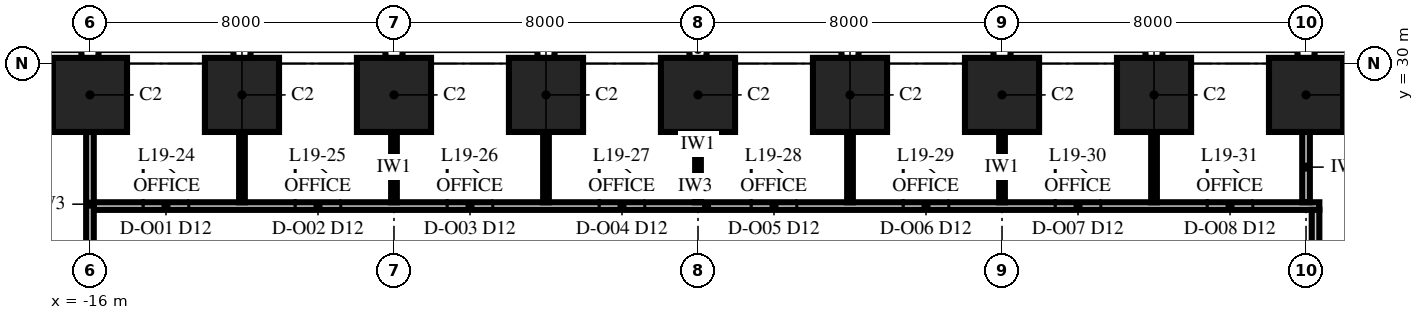
"""IFC4 building model, lengths in metres.
Left out: names, types, materials, properties, quantities, classifications, styles, units other than length and angle.
Written with IfcOpenShell. Run it as: python <this file> out.ifc"""

import sys

from ifc_helpers import new_model, si_unit, direction, frame, frame_2d, origin, origin_2d, place, context, subcontext, project, spatial, rectangle, extrude, element, fill, save


model = new_model("IFC4")
c1 = context("Model", 3, precision=1e-05, world=origin(), true_north=direction((0.0, 1.0)))
c2 = subcontext(c1, "Body", "Model", "MODEL_VIEW")
j1 = project(units=[si_unit("LENGTHUNIT", "METRE"), si_unit("PLANEANGLEUNIT", "RADIAN")], contexts=[c1])
p1 = place(None, origin())
s1 = spatial("IfcSite", under=j1, at=p1, CompositionType="ELEMENT")
p2 = place(p1, origin())
s2 = spatial("IfcBuilding", under=s1, at=p2, CompositionType="ELEMENT")
p3 = place(p2, frame((0.0, 0.0, 88.0)))
s3 = spatial("IfcBuildingStorey", under=s2, at=p3, CompositionType="ELEMENT", Elevation=88.0)
for number, where, z_axis, x_axis in (
    (1, (16.0, 29.175, 0.0), (0.0, 0.0, 1.0), (-1.0, 0.0, 0.0)),
    (2, (12.0, 29.175, 0.0), (0.0, 0.0, 1.0), (-1.0, 0.0, 0.0)),
    (3, (8.0, 29.175, 0.0), (0.0, 0.0, 1.0), (-1.0, 0.0, 0.0)),
    (4, (4.0, 29.175, 0.0), (0.0, 0.0, 1.0), (-1.0, 0.0, 0.0)),
    (5, (0.0, 29.175, 0.0), (0.0, 0.0, 1.0), (-1.0, 0.0, 0.0)),
    (6, (-4.0, 29.175, 0.0), (0.0, 0.0, 1.0), (-1.0, 0.0, 0.0)),
    (7, (-8.0, 29.175, 0.0), (0.0, 0.0, 1.0), (-1.0, 0.0, 0.0)),
    (8, (-12.0, 29.175, 0.0), (0.0, 0.0, 1.0), (-1.0, 0.0, 0.0)),
    (9, (-16.0, 29.175, 0.0), (0.0, 0.0, 1.0), (-1.0, 0.0, 0.0)),
):
    element("IfcColumn", number, at=place(p3, frame(where, z_axis=z_axis, x_axis=x_axis)), inside=s3, PredefinedType="COLUMN", context=c2, shape_type="SweptSolid", body=[
        extrude(rectangle(XDim=1.95, YDim=1.95, at=origin_2d()), origin(), (0.0, 0.0, 1.0), 4.0),
    ])
p4 = place(p3, frame((-15.9, 26.25, 0.0), z_axis=(0.0, 0.0, 1.0), x_axis=(1.0, 0.0, 0.0)))
e10 = element("IfcWall", 10, at=p4, inside=s3, PredefinedType="PARTITIONING", context=c2, shape_type="SweptSolid", body=[
    extrude(rectangle(XDim=32.25, YDim=0.2, at=frame_2d((16.125, 0.0))), origin(), (0.0, 0.0, 1.0), 3.318),
])
p5 = place(p4, frame((1.3, 0.0, 0.0)))
e11 = element("IfcOpeningElement", 11, at=p5, cuts=e10, PredefinedType="OPENING", context=c2, shape_type="SweptSolid", body=[
    extrude(rectangle(XDim=1.2, YDim=2.4, at=frame_2d((0.6, 1.2))), frame((0.0, 0.115, 0.0), z_axis=(0.0, -1.0, 0.0), x_axis=(1.0, 0.0, 0.0)), (0.0, 0.0, 1.0), 0.23),
])
p6 = place(p4, frame((5.3, 0.0, 0.0)))
e12 = element("IfcOpeningElement", 12, at=p6, cuts=e10, PredefinedType="OPENING", context=c2, shape_type="SweptSolid", body=[
    extrude(rectangle(XDim=1.2, YDim=2.4, at=frame_2d((0.6, 1.2))), frame((0.0, 0.115, 0.0), z_axis=(0.0, -1.0, 0.0), x_axis=(1.0, 0.0, 0.0)), (0.0, 0.0, 1.0), 0.23),
])
p7 = place(p4, frame((9.3, 0.0, 0.0)))
e13 = element("IfcOpeningElement", 13, at=p7, cuts=e10, PredefinedType="OPENING", context=c2, shape_type="SweptSolid", body=[
    extrude(rectangle(XDim=1.2, YDim=2.4, at=frame_2d((0.6, 1.2))), frame((0.0, 0.115, 0.0), z_axis=(0.0, -1.0, 0.0), x_axis=(1.0, 0.0, 0.0)), (0.0, 0.0, 1.0), 0.23),
])
p8 = place(p4, frame((13.3, 0.0, 0.0)))
e14 = element("IfcOpeningElement", 14, at=p8, cuts=e10, PredefinedType="OPENING", context=c2, shape_type="SweptSolid", body=[
    extrude(rectangle(XDim=1.2, YDim=2.4, at=frame_2d((0.6, 1.2))), frame((0.0, 0.115, 0.0), z_axis=(0.0, -1.0, 0.0), x_axis=(1.0, 0.0, 0.0)), (0.0, 0.0, 1.0), 0.23),
])
p9 = place(p4, frame((17.3, 0.0, 0.0)))
e15 = element("IfcOpeningElement", 15, at=p9, cuts=e10, PredefinedType="OPENING", context=c2, shape_type="SweptSolid", body=[
    extrude(rectangle(XDim=1.2, YDim=2.4, at=frame_2d((0.6, 1.2))), frame((0.0, 0.115, 0.0), z_axis=(0.0, -1.0, 0.0), x_axis=(1.0, 0.0, 0.0)), (0.0, 0.0, 1.0), 0.23),
])
p10 = place(p4, frame((21.3, 0.0, 0.0)))
e16 = element("IfcOpeningElement", 16, at=p10, cuts=e10, PredefinedType="OPENING", context=c2, shape_type="SweptSolid", body=[
    extrude(rectangle(XDim=1.2, YDim=2.4, at=frame_2d((0.6, 1.2))), frame((0.0, 0.115, 0.0), z_axis=(0.0, -1.0, 0.0), x_axis=(1.0, 0.0, 0.0)), (0.0, 0.0, 1.0), 0.23),
])
p11 = place(p4, frame((25.3, 0.0, 0.0)))
e17 = element("IfcOpeningElement", 17, at=p11, cuts=e10, PredefinedType="OPENING", context=c2, shape_type="SweptSolid", body=[
    extrude(rectangle(XDim=1.2, YDim=2.4, at=frame_2d((0.6, 1.2))), frame((0.0, 0.115, 0.0), z_axis=(0.0, -1.0, 0.0), x_axis=(1.0, 0.0, 0.0)), (0.0, 0.0, 1.0), 0.23),
])
p12 = place(p4, frame((29.3, 0.0, 0.0)))
e18 = element("IfcOpeningElement", 18, at=p12, cuts=e10, PredefinedType="OPENING", context=c2, shape_type="SweptSolid", body=[
    extrude(rectangle(XDim=1.2, YDim=2.4, at=frame_2d((0.6, 1.2))), frame((0.0, 0.115, 0.0), z_axis=(0.0, -1.0, 0.0), x_axis=(1.0, 0.0, 0.0)), (0.0, 0.0, 1.0), 0.23),
])
p13 = place(p3, frame((-16.0, 24.4, 0.0), z_axis=(0.0, 0.0, 1.0), x_axis=(0.0, 1.0, 0.0)))
e19 = element("IfcWall", 19, at=p13, inside=s3, PredefinedType="PARTITIONING", context=c2, shape_type="SweptSolid", body=[
    extrude(rectangle(XDim=3.8, YDim=0.2, at=frame_2d((1.9, 0.0))), origin(), (0.0, 0.0, 1.0), 3.226),
])
for number, where, z_axis, x_axis in (
    (20, (-12.0, 26.35, 0.0), (0.0, 0.0, 1.0), (0.0, 1.0, 0.0)),
    (21, (-8.0, 26.35, 0.0), (0.0, 0.0, 1.0), (0.0, 1.0, 0.0)),
    (22, (-4.0, 26.35, 0.0), (0.0, 0.0, 1.0), (0.0, 1.0, 0.0)),
    (23, (0.0, 26.35, 0.0), (0.0, 0.0, 1.0), (0.0, 1.0, 0.0)),
    (24, (4.0, 26.35, 0.0), (0.0, 0.0, 1.0), (0.0, 1.0, 0.0)),
    (25, (8.0, 26.35, 0.0), (0.0, 0.0, 1.0), (0.0, 1.0, 0.0)),
    (26, (12.0, 26.35, 0.0), (0.0, 0.0, 1.0), (0.0, 1.0, 0.0)),
):
    element("IfcWall", number, at=place(p3, frame(where, z_axis=z_axis, x_axis=x_axis)), inside=s3, PredefinedType="PARTITIONING", context=c2, shape_type="SweptSolid", body=[
        extrude(rectangle(XDim=1.85, YDim=0.15, at=frame_2d((0.925, 0.0))), origin(), (0.0, 0.0, 1.0), 3.318),
    ])
p14 = place(p3, frame((16.0, 26.35, 0.0), z_axis=(0.0, 0.0, 1.0), x_axis=(0.0, 1.0, 0.0)))
e27 = element("IfcWall", 27, at=p14, inside=s3, PredefinedType="PARTITIONING", context=c2, shape_type="SweptSolid", body=[
    extrude(rectangle(XDim=1.85, YDim=0.2, at=frame_2d((0.925, 0.0))), origin(), (0.0, 0.0, 1.0), 3.318),
])
p15 = place(p3, frame((16.25, 9.9, 0.0), z_axis=(0.0, 0.0, 1.0), x_axis=(0.0, 1.0, 0.0)))
e28 = element("IfcWall", 28, at=p15, inside=s3, PredefinedType="PARTITIONING", context=c2, shape_type="SweptSolid", body=[
    extrude(rectangle(XDim=16.25, YDim=0.2, at=frame_2d((8.125, 0.0))), origin(), (0.0, 0.0, 1.0), 3.13),
])
p16 = place(p15, frame((7.95, 0.0, 0.0)))
e29 = element("IfcOpeningElement", 29, at=p16, cuts=e28, PredefinedType="OPENING", context=c2, shape_type="SweptSolid", body=[
    extrude(rectangle(XDim=1.2, YDim=2.4, at=frame_2d((0.6, 1.2))), frame((0.0, 0.115, 0.0), z_axis=(0.0, -1.0, 0.0), x_axis=(1.0, 0.0, 0.0)), (0.0, 0.0, 1.0), 0.23),
])
p17 = place(p5, origin())
e30 = element("IfcDoor", 30, at=p17, inside=s3, OperationType="SINGLE_SWING_LEFT", PredefinedType="DOOR", context=c2, shape_type="SweptSolid", body=[
    extrude(rectangle(XDim=1.2, YDim=2.4, at=frame_2d((0.6, 1.2))), frame((0.0, 0.1, 0.0), z_axis=(0.0, -1.0, 0.0), x_axis=(1.0, 0.0, 0.0)), (0.0, 0.0, 1.0), 0.199),
])
fill(e11, e30)
p18 = place(p6, origin())
e31 = element("IfcDoor", 31, at=p18, inside=s3, OperationType="SINGLE_SWING_LEFT", PredefinedType="DOOR", context=c2, shape_type="SweptSolid", body=[
    extrude(rectangle(XDim=1.2, YDim=2.4, at=frame_2d((0.6, 1.2))), frame((0.0, 0.1, 0.0), z_axis=(0.0, -1.0, 0.0), x_axis=(1.0, 0.0, 0.0)), (0.0, 0.0, 1.0), 0.199),
])
fill(e12, e31)
p19 = place(p7, origin())
e32 = element("IfcDoor", 32, at=p19, inside=s3, OperationType="SINGLE_SWING_LEFT", PredefinedType="DOOR", context=c2, shape_type="SweptSolid", body=[
    extrude(rectangle(XDim=1.2, YDim=2.4, at=frame_2d((0.6, 1.2))), frame((0.0, 0.1, 0.0), z_axis=(0.0, -1.0, 0.0), x_axis=(1.0, 0.0, 0.0)), (0.0, 0.0, 1.0), 0.199),
])
fill(e13, e32)
p20 = place(p8, origin())
e33 = element("IfcDoor", 33, at=p20, inside=s3, OperationType="SINGLE_SWING_LEFT", PredefinedType="DOOR", context=c2, shape_type="SweptSolid", body=[
    extrude(rectangle(XDim=1.2, YDim=2.4, at=frame_2d((0.6, 1.2))), frame((0.0, 0.1, 0.0), z_axis=(0.0, -1.0, 0.0), x_axis=(1.0, 0.0, 0.0)), (0.0, 0.0, 1.0), 0.199),
])
fill(e14, e33)
p21 = place(p9, origin())
e34 = element("IfcDoor", 34, at=p21, inside=s3, OperationType="SINGLE_SWING_LEFT", PredefinedType="DOOR", context=c2, shape_type="SweptSolid", body=[
    extrude(rectangle(XDim=1.2, YDim=2.4, at=frame_2d((0.6, 1.2))), frame((0.0, 0.1, 0.0), z_axis=(0.0, -1.0, 0.0), x_axis=(1.0, 0.0, 0.0)), (0.0, 0.0, 1.0), 0.199),
])
fill(e15, e34)
p22 = place(p10, origin())
e35 = element("IfcDoor", 35, at=p22, inside=s3, OperationType="SINGLE_SWING_LEFT", PredefinedType="DOOR", context=c2, shape_type="SweptSolid", body=[
    extrude(rectangle(XDim=1.2, YDim=2.4, at=frame_2d((0.6, 1.2))), frame((0.0, 0.1, 0.0), z_axis=(0.0, -1.0, 0.0), x_axis=(1.0, 0.0, 0.0)), (0.0, 0.0, 1.0), 0.199),
])
fill(e16, e35)
p23 = place(p11, origin())
e36 = element("IfcDoor", 36, at=p23, inside=s3, OperationType="SINGLE_SWING_LEFT", PredefinedType="DOOR", context=c2, shape_type="SweptSolid", body=[
    extrude(rectangle(XDim=1.2, YDim=2.4, at=frame_2d((0.6, 1.2))), frame((0.0, 0.1, 0.0), z_axis=(0.0, -1.0, 0.0), x_axis=(1.0, 0.0, 0.0)), (0.0, 0.0, 1.0), 0.199),
])
fill(e17, e36)
p24 = place(p12, origin())
e37 = element("IfcDoor", 37, at=p24, inside=s3, OperationType="SINGLE_SWING_LEFT", PredefinedType="DOOR", context=c2, shape_type="SweptSolid", body=[
    extrude(rectangle(XDim=1.2, YDim=2.4, at=frame_2d((0.6, 1.2))), frame((0.0, 0.1, 0.0), z_axis=(0.0, -1.0, 0.0), x_axis=(1.0, 0.0, 0.0)), (0.0, 0.0, 1.0), 0.199),
])
fill(e18, e37)
save(model, sys.argv[1])
